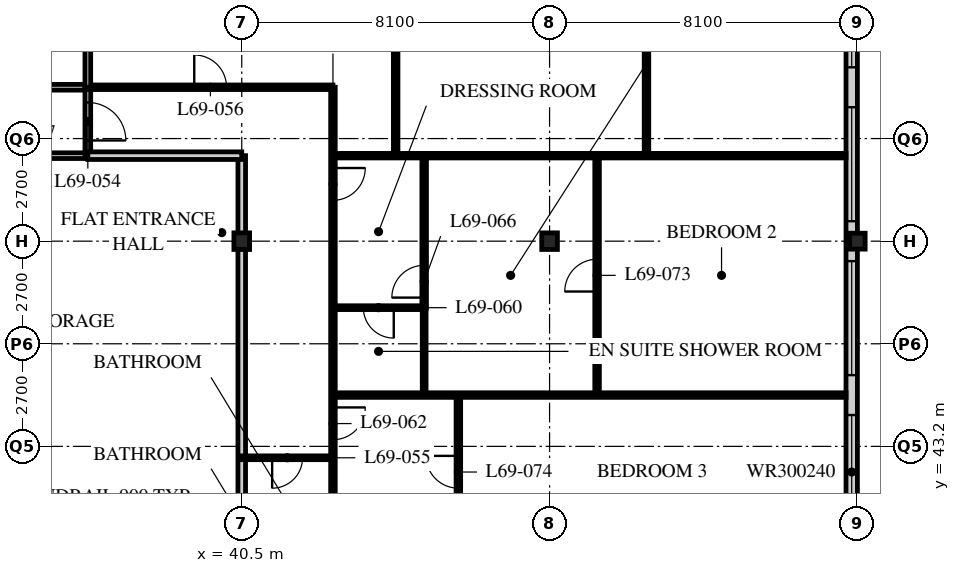
"""IFC4 building model, lengths in metres.
Left out: names, types, materials, properties, quantities, classifications, styles, units other than length and angle.
Written with IfcOpenShell. Run it as: python <this file> out.ifc"""

import sys

from ifc_helpers import new_model, si_unit, direction, frame, frame_2d, origin, origin_2d, place, context, subcontext, project, spatial, rectangle, i_section, extrude, element, fill, save


model = new_model("IFC4")
c1 = context("Model", 3, precision=1e-05, world=origin(), true_north=direction((0.0, 1.0)))
c2 = subcontext(c1, "Body", "Model", "MODEL_VIEW")
j1 = project(units=[si_unit("LENGTHUNIT", "METRE"), si_unit("PLANEANGLEUNIT", "RADIAN")], contexts=[c1])
p1 = place(None, origin())
s1 = spatial("IfcSite", under=j1, at=p1, CompositionType="ELEMENT")
p2 = place(p1, origin())
s2 = spatial("IfcBuilding", under=s1, at=p2, CompositionType="ELEMENT")
p3 = place(p2, frame((0.0, 0.0, 269.7)))
s3 = spatial("IfcBuildingStorey", under=s2, at=p3, CompositionType="ELEMENT", Elevation=269.7)
for number, where, z_axis, x_axis in (
    (1, (40.5, 48.6, 0.0), (0.0, 0.0, 1.0), (1.0, 0.0, 0.0)),
    (2, (48.6, 48.6, 0.0), (0.0, 0.0, 1.0), (1.0, 0.0, 0.0)),
):
    element("IfcColumn", number, at=place(p3, frame(where, z_axis=z_axis, x_axis=x_axis)), inside=s3, PredefinedType="COLUMN", context=c2, shape_type="SweptSolid", body=[
        extrude(i_section(OverallWidth=0.412, OverallDepth=0.437, WebThickness=0.036, FlangeThickness=0.058, FilletRadius=0.015, at=origin_2d()), origin(), (0.0, 0.0, 1.0), 3.9),
    ])
p4 = place(p3, frame((56.7, 48.6, 0.0), z_axis=(0.0, 0.0, 1.0), x_axis=(1.0, 0.0, 0.0)))
e3 = element("IfcColumn", 3, at=p4, inside=s3, PredefinedType="COLUMN", context=c2, shape_type="SweptSolid", body=[
    extrude(i_section(OverallWidth=0.407, OverallDepth=0.419, WebThickness=0.031, FlangeThickness=0.049, FilletRadius=0.015, at=origin_2d()), origin(), (0.0, 0.0, 1.0), 3.9),
])
p5 = place(p3, frame((56.55, 24.6, 0.0), z_axis=(0.0, 0.0, 1.0), x_axis=(0.0, 1.0, 0.0)))
e4 = element("IfcWall", 4, at=p5, inside=s3, PredefinedType="SOLIDWALL", context=c2, shape_type="SweptSolid", body=[
    extrude(rectangle(XDim=32.1, YDim=0.3, at=frame_2d((16.05, 0.0))), origin(), (0.0, 0.0, 1.0), 3.69),
])
p6 = place(p5, frame((0.225, 0.0, 0.6)))
e5 = element("IfcOpeningElement", 5, at=p6, cuts=e4, PredefinedType="OPENING", context=c2, shape_type="SweptSolid", body=[
    extrude(rectangle(XDim=3.0, YDim=2.4, at=frame_2d((1.5, 1.2))), frame((0.0, 0.16, 0.0), z_axis=(0.0, -1.0, 0.0), x_axis=(1.0, 0.0, 0.0)), (0.0, 0.0, 1.0), 0.32),
])
p7 = place(p5, frame((4.275, 0.0, 0.6)))
e6 = element("IfcOpeningElement", 6, at=p7, cuts=e4, PredefinedType="OPENING", context=c2, shape_type="SweptSolid", body=[
    extrude(rectangle(XDim=3.0, YDim=2.4, at=frame_2d((1.5, 1.2))), frame((0.0, 0.16, 0.0), z_axis=(0.0, -1.0, 0.0), x_axis=(1.0, 0.0, 0.0)), (0.0, 0.0, 1.0), 0.32),
])
p8 = place(p5, frame((8.325, 0.0, 0.6)))
e7 = element("IfcOpeningElement", 7, at=p8, cuts=e4, PredefinedType="OPENING", context=c2, shape_type="SweptSolid", body=[
    extrude(rectangle(XDim=3.0, YDim=2.4, at=frame_2d((1.5, 1.2))), frame((0.0, 0.16, 0.0), z_axis=(0.0, -1.0, 0.0), x_axis=(1.0, 0.0, 0.0)), (0.0, 0.0, 1.0), 0.32),
])
p9 = place(p5, frame((12.375, 0.0, 0.6)))
e8 = element("IfcOpeningElement", 8, at=p9, cuts=e4, PredefinedType="OPENING", context=c2, shape_type="SweptSolid", body=[
    extrude(rectangle(XDim=3.0, YDim=2.4, at=frame_2d((1.5, 1.2))), frame((0.0, 0.16, 0.0), z_axis=(0.0, -1.0, 0.0), x_axis=(1.0, 0.0, 0.0)), (0.0, 0.0, 1.0), 0.32),
])
p10 = place(p5, frame((16.425, 0.0, 0.6)))
e9 = element("IfcOpeningElement", 9, at=p10, cuts=e4, PredefinedType="OPENING", context=c2, shape_type="SweptSolid", body=[
    extrude(rectangle(XDim=3.0, YDim=2.4, at=frame_2d((1.5, 1.2))), frame((0.0, 0.16, 0.0), z_axis=(0.0, -1.0, 0.0), x_axis=(1.0, 0.0, 0.0)), (0.0, 0.0, 1.0), 0.32),
])
p11 = place(p5, frame((20.475, 0.0, 0.6)))
e10 = element("IfcOpeningElement", 10, at=p11, cuts=e4, PredefinedType="OPENING", context=c2, shape_type="SweptSolid", body=[
    extrude(rectangle(XDim=3.0, YDim=2.4, at=frame_2d((1.5, 1.2))), frame((0.0, 0.16, 0.0), z_axis=(0.0, -1.0, 0.0), x_axis=(1.0, 0.0, 0.0)), (0.0, 0.0, 1.0), 0.32),
])
p12 = place(p5, frame((24.525, 0.0, 0.6)))
e11 = element("IfcOpeningElement", 11, at=p12, cuts=e4, PredefinedType="OPENING", context=c2, shape_type="SweptSolid", body=[
    extrude(rectangle(XDim=3.0, YDim=2.4, at=frame_2d((1.5, 1.2))), frame((0.0, 0.16, 0.0), z_axis=(0.0, -1.0, 0.0), x_axis=(1.0, 0.0, 0.0)), (0.0, 0.0, 1.0), 0.32),
])
p13 = place(p5, frame((28.575, 0.0, 0.6)))
e12 = element("IfcOpeningElement", 12, at=p13, cuts=e4, PredefinedType="OPENING", context=c2, shape_type="SweptSolid", body=[
    extrude(rectangle(XDim=3.0, YDim=2.4, at=frame_2d((1.5, 1.2))), frame((0.0, 0.16, 0.0), z_axis=(0.0, -1.0, 0.0), x_axis=(1.0, 0.0, 0.0)), (0.0, 0.0, 1.0), 0.32),
])
p14 = place(p3, frame((12.15, 52.65, 0.0), z_axis=(0.0, 0.0, 1.0), x_axis=(1.0, 0.0, 0.0)))
e13 = element("IfcWall", 13, at=p14, inside=s3, PredefinedType="PARTITIONING", context=c2, shape_type="SweptSolid", body=[
    extrude(rectangle(XDim=24.3, YDim=0.15, at=frame_2d((12.15, 0.0))), origin(), (0.0, 0.0, 1.0), 3.69),
])
p15 = place(p14, frame((6.4, 0.0, 0.0)))
e14 = element("IfcOpeningElement", 14, at=p15, cuts=e13, PredefinedType="OPENING", context=c2, shape_type="SweptSolid", body=[
    extrude(rectangle(XDim=1.0, YDim=2.1, at=frame_2d((0.5, 1.05))), frame((0.0, 0.085, 0.0), z_axis=(0.0, -1.0, 0.0), x_axis=(1.0, 0.0, 0.0)), (0.0, 0.0, 1.0), 0.17),
])
p16 = place(p14, frame((8.5, 0.0, 0.0)))
e15 = element("IfcOpeningElement", 15, at=p16, cuts=e13, PredefinedType="OPENING", context=c2, shape_type="SweptSolid", body=[
    extrude(rectangle(XDim=1.0, YDim=2.1, at=frame_2d((0.5, 1.05))), frame((0.0, 0.085, 0.0), z_axis=(0.0, -1.0, 0.0), x_axis=(1.0, 0.0, 0.0)), (0.0, 0.0, 1.0), 0.17),
])
p17 = place(p14, frame((16.6, 0.0, 0.0)))
e16 = element("IfcOpeningElement", 16, at=p17, cuts=e13, PredefinedType="OPENING", context=c2, shape_type="SweptSolid", body=[
    extrude(rectangle(XDim=1.0, YDim=2.1, at=frame_2d((0.5, 1.05))), frame((0.0, 0.085, 0.0), z_axis=(0.0, -1.0, 0.0), x_axis=(1.0, 0.0, 0.0)), (0.0, 0.0, 1.0), 0.17),
])
p18 = place(p14, frame((1.525, 0.0, 0.0)))
e17 = element("IfcOpeningElement", 17, at=p18, cuts=e13, PredefinedType="OPENING", context=c2, shape_type="SweptSolid", body=[
    extrude(rectangle(XDim=1.0, YDim=2.1, at=frame_2d((0.5, 1.05))), frame((0.0, 0.085, 0.0), z_axis=(0.0, -1.0, 0.0), x_axis=(1.0, 0.0, 0.0)), (0.0, 0.0, 1.0), 0.17),
])
p19 = place(p3, frame((29.56, 50.85, 0.0), z_axis=(0.0, 0.0, 1.0), x_axis=(1.0, 0.0, 0.0)))
e18 = element("IfcWall", 18, at=p19, inside=s3, PredefinedType="PARTITIONING", context=c2, shape_type="SweptSolid", body=[
    extrude(rectangle(XDim=6.89, YDim=0.15, at=frame_2d((3.445, 0.0))), origin(), (0.0, 0.0, 1.0), 3.69),
])
p20 = place(p19, frame((1.49, 0.0, 0.0)))
e19 = element("IfcOpeningElement", 19, at=p20, cuts=e18, PredefinedType="OPENING", context=c2, shape_type="SweptSolid", body=[
    extrude(rectangle(XDim=1.0, YDim=2.1, at=frame_2d((0.5, 1.05))), frame((0.0, 0.085, 0.0), z_axis=(0.0, -1.0, 0.0), x_axis=(1.0, 0.0, 0.0)), (0.0, 0.0, 1.0), 0.17),
])
p21 = place(p19, frame((4.69, 0.0, 0.0)))
e20 = element("IfcOpeningElement", 20, at=p21, cuts=e18, PredefinedType="OPENING", context=c2, shape_type="SweptSolid", body=[
    extrude(rectangle(XDim=1.0, YDim=2.1, at=frame_2d((0.5, 1.05))), frame((0.0, 0.085, 0.0), z_axis=(0.0, -1.0, 0.0), x_axis=(1.0, 0.0, 0.0)), (0.0, 0.0, 1.0), 0.17),
])
p22 = place(p3, frame((36.45, 50.85, 0.0), z_axis=(0.0, 0.0, 1.0), x_axis=(0.0, 1.0, 0.0)))
e21 = element("IfcWall", 21, at=p22, inside=s3, PredefinedType="PARTITIONING", context=c2, shape_type="SweptSolid", body=[
    extrude(rectangle(XDim=1.8, YDim=0.15, at=frame_2d((0.9, 0.0))), origin(), (0.0, 0.0, 1.0), 3.69),
])
p23 = place(p22, frame((0.4, 0.0, 0.0)))
e22 = element("IfcOpeningElement", 22, at=p23, cuts=e21, PredefinedType="OPENING", context=c2, shape_type="SweptSolid", body=[
    extrude(rectangle(XDim=1.0, YDim=2.1, at=frame_2d((0.5, 1.05))), frame((0.0, 0.085, 0.0), z_axis=(0.0, -1.0, 0.0), x_axis=(1.0, 0.0, 0.0)), (0.0, 0.0, 1.0), 0.17),
])
p24 = place(p3, frame((40.5, 40.5, 0.0), z_axis=(0.0, 0.0, 1.0), x_axis=(0.0, 1.0, 0.0)))
e23 = element("IfcWall", 23, at=p24, inside=s3, PredefinedType="SOLIDWALL", context=c2, shape_type="SweptSolid", body=[
    extrude(rectangle(XDim=10.35, YDim=0.2, at=frame_2d((5.175, 0.0))), origin(), (0.0, 0.0, 1.0), 3.078),
])
p25 = place(p3, frame((40.5, 42.9, 0.0), z_axis=(0.0, 0.0, 1.0), x_axis=(1.0, 0.0, 0.0)))
e24 = element("IfcWall", 24, at=p25, inside=s3, PredefinedType="PARTITIONING", context=c2, shape_type="SweptSolid", body=[
    extrude(rectangle(XDim=2.4, YDim=0.1, at=frame_2d((1.2, 0.0))), origin(), (0.0, 0.0, 1.0), 3.69),
])
p26 = place(p25, frame((0.8, 0.0, 0.0)))
e25 = element("IfcOpeningElement", 25, at=p26, cuts=e24, PredefinedType="OPENING", context=c2, shape_type="SweptSolid", body=[
    extrude(rectangle(XDim=0.8, YDim=2.1, at=frame_2d((0.4, 1.05))), frame((0.0, 0.06, 0.0), z_axis=(0.0, -1.0, 0.0), x_axis=(1.0, 0.0, 0.0)), (0.0, 0.0, 1.0), 0.12),
])
p27 = place(p3, frame((42.9, 52.65, 0.0), z_axis=(0.0, 0.0, 1.0), x_axis=(0.0, -1.0, 0.0)))
e26 = element("IfcWall", 26, at=p27, inside=s3, PredefinedType="PARTITIONING", context=c2, shape_type="SweptSolid", body=[
    extrude(rectangle(XDim=12.15, YDim=0.12, at=frame_2d((6.075, 0.0))), origin(), (0.0, 0.0, 1.0), 3.69),
])
p28 = place(p27, frame((2.125, 0.0, 0.0)))
e27 = element("IfcOpeningElement", 27, at=p28, cuts=e26, PredefinedType="OPENING", context=c2, shape_type="SweptSolid", body=[
    extrude(rectangle(XDim=0.85, YDim=2.1, at=frame_2d((0.425, 1.05))), frame((0.0, 0.07, 0.0), z_axis=(0.0, -1.0, 0.0), x_axis=(1.0, 0.0, 0.0)), (0.0, 0.0, 1.0), 0.14),
])
p29 = place(p27, frame((8.425, 0.0, 0.0)))
e28 = element("IfcOpeningElement", 28, at=p29, cuts=e26, PredefinedType="OPENING", context=c2, shape_type="SweptSolid", body=[
    extrude(rectangle(XDim=0.85, YDim=2.1, at=frame_2d((0.425, 1.05))), frame((0.0, 0.07, 0.0), z_axis=(0.0, -1.0, 0.0), x_axis=(1.0, 0.0, 0.0)), (0.0, 0.0, 1.0), 0.14),
])
p30 = place(p3, frame((36.45, 52.65, 0.0), z_axis=(0.0, 0.0, 1.0), x_axis=(1.0, 0.0, 0.0)))
e29 = element("IfcWall", 29, at=p30, inside=s3, PredefinedType="PARTITIONING", context=c2, shape_type="SweptSolid", body=[
    extrude(rectangle(XDim=6.45, YDim=0.12, at=frame_2d((3.225, 0.0))), origin(), (0.0, 0.0, 1.0), 3.69),
])
p31 = place(p30, frame((2.8, 0.0, 0.0)))
e30 = element("IfcOpeningElement", 30, at=p31, cuts=e29, PredefinedType="OPENING", context=c2, shape_type="SweptSolid", body=[
    extrude(rectangle(XDim=0.85, YDim=2.1, at=frame_2d((0.425, 1.05))), frame((0.0, 0.07, 0.0), z_axis=(0.0, -1.0, 0.0), x_axis=(1.0, 0.0, 0.0)), (0.0, 0.0, 1.0), 0.14),
])
p32 = place(p3, frame((36.45, 50.85, 0.0), z_axis=(0.0, 0.0, 1.0), x_axis=(1.0, 0.0, 0.0)))
e31 = element("IfcWall", 31, at=p32, inside=s3, PredefinedType="SOLIDWALL", context=c2, shape_type="SweptSolid", body=[
    extrude(rectangle(XDim=4.05, YDim=0.2, at=frame_2d((2.025, 0.0))), origin(), (0.0, 0.0, 1.0), 3.69),
])
p33 = place(p3, frame((42.9, 50.85, 0.0), z_axis=(0.0, 0.0, 1.0), x_axis=(1.0, 0.0, 0.0)))
e32 = element("IfcWall", 32, at=p33, inside=s3, PredefinedType="PARTITIONING", context=c2, shape_type="SweptSolid", body=[
    extrude(rectangle(XDim=13.5, YDim=0.12, at=frame_2d((6.75, 0.0))), origin(), (0.0, 0.0, 1.0), 3.69),
])
p34 = place(p3, frame((36.45, 64.5, 0.0), z_axis=(0.0, 0.0, 1.0), x_axis=(0.0, -1.0, 0.0)))
e33 = element("IfcWall", 33, at=p34, inside=s3, PredefinedType="PARTITIONING", context=c2, shape_type="SweptSolid", body=[
    extrude(rectangle(XDim=11.85, YDim=0.15, at=frame_2d((5.925, 0.0))), origin(), (0.0, 0.0, 1.0), 3.69),
])
p35 = place(p3, frame((44.55, 64.5, 0.0), z_axis=(0.0, 0.0, 1.0), x_axis=(0.0, -1.0, 0.0)))
e34 = element("IfcWall", 34, at=p35, inside=s3, PredefinedType="PARTITIONING", context=c2, shape_type="SweptSolid", body=[
    extrude(rectangle(XDim=13.65, YDim=0.12, at=frame_2d((6.825, 0.0))), origin(), (0.0, 0.0, 1.0), 3.69),
])
p36 = place(p35, frame((8.425, 0.0, 0.0)))
e35 = element("IfcOpeningElement", 35, at=p36, cuts=e34, PredefinedType="OPENING", context=c2, shape_type="SweptSolid", body=[
    extrude(rectangle(XDim=0.85, YDim=2.1, at=frame_2d((0.425, 1.05))), frame((0.0, 0.07, 0.0), z_axis=(0.0, -1.0, 0.0), x_axis=(1.0, 0.0, 0.0)), (0.0, 0.0, 1.0), 0.14),
])
p37 = place(p35, frame((2.5, 0.0, 0.0)))
e36 = element("IfcOpeningElement", 36, at=p37, cuts=e34, PredefinedType="OPENING", context=c2, shape_type="SweptSolid", body=[
    extrude(rectangle(XDim=0.85, YDim=2.1, at=frame_2d((0.425, 1.05))), frame((0.0, 0.07, 0.0), z_axis=(0.0, -1.0, 0.0), x_axis=(1.0, 0.0, 0.0)), (0.0, 0.0, 1.0), 0.14),
])
p38 = place(p3, frame((42.9, 46.85, 0.0), z_axis=(0.0, 0.0, 1.0), x_axis=(1.0, 0.0, 0.0)))
e37 = element("IfcWall", 37, at=p38, inside=s3, PredefinedType="PARTITIONING", context=c2, shape_type="SweptSolid", body=[
    extrude(rectangle(XDim=2.4, YDim=0.1, at=frame_2d((1.2, 0.0))), origin(), (0.0, 0.0, 1.0), 3.69),
])
p39 = place(p38, frame((0.8, 0.0, 0.0)))
e38 = element("IfcOpeningElement", 38, at=p39, cuts=e37, PredefinedType="OPENING", context=c2, shape_type="SweptSolid", body=[
    extrude(rectangle(XDim=0.8, YDim=2.1, at=frame_2d((0.4, 1.05))), frame((0.0, 0.06, 0.0), z_axis=(0.0, -1.0, 0.0), x_axis=(1.0, 0.0, 0.0)), (0.0, 0.0, 1.0), 0.12),
])
p40 = place(p3, frame((45.3, 46.85, 0.0), z_axis=(0.0, 0.0, 1.0), x_axis=(0.0, -1.0, 0.0)))
e39 = element("IfcWall", 39, at=p40, inside=s3, PredefinedType="PARTITIONING", context=c2, shape_type="SweptSolid", body=[
    extrude(rectangle(XDim=2.3, YDim=0.1, at=frame_2d((1.15, 0.0))), origin(), (0.0, 0.0, 1.0), 3.69),
])
p41 = place(p3, frame((42.9, 44.55, 0.0), z_axis=(0.0, 0.0, 1.0), x_axis=(1.0, 0.0, 0.0)))
e40 = element("IfcWall", 40, at=p41, inside=s3, PredefinedType="PARTITIONING", context=c2, shape_type="SweptSolid", body=[
    extrude(rectangle(XDim=13.5, YDim=0.12, at=frame_2d((6.75, 0.0))), origin(), (0.0, 0.0, 1.0), 3.69),
])
p42 = place(p3, frame((45.3, 50.85, 0.0), z_axis=(0.0, 0.0, 1.0), x_axis=(0.0, -1.0, 0.0)))
e41 = element("IfcWall", 41, at=p42, inside=s3, PredefinedType="PARTITIONING", context=c2, shape_type="SweptSolid", body=[
    extrude(rectangle(XDim=4.01, YDim=0.12, at=frame_2d((2.005, 0.0))), origin(), (0.0, 0.0, 1.0), 3.69),
])
p43 = place(p42, frame((2.885, 0.0, 0.0)))
e42 = element("IfcOpeningElement", 42, at=p43, cuts=e41, PredefinedType="OPENING", context=c2, shape_type="SweptSolid", body=[
    extrude(rectangle(XDim=0.85, YDim=2.1, at=frame_2d((0.425, 1.05))), frame((0.0, 0.07, 0.0), z_axis=(0.0, -1.0, 0.0), x_axis=(1.0, 0.0, 0.0)), (0.0, 0.0, 1.0), 0.14),
])
p44 = place(p3, frame((46.2, 28.35, 0.0), z_axis=(0.0, 0.0, 1.0), x_axis=(0.0, 1.0, 0.0)))
e43 = element("IfcWall", 43, at=p44, inside=s3, PredefinedType="PARTITIONING", context=c2, shape_type="SweptSolid", body=[
    extrude(rectangle(XDim=16.2, YDim=0.12, at=frame_2d((8.1, 0.0))), origin(), (0.0, 0.0, 1.0), 3.69),
])
p45 = place(p44, frame((1.6, 0.0, 0.0)))
e44 = element("IfcOpeningElement", 44, at=p45, cuts=e43, PredefinedType="OPENING", context=c2, shape_type="SweptSolid", body=[
    extrude(rectangle(XDim=0.85, YDim=2.1, at=frame_2d((0.425, 1.05))), frame((0.0, 0.07, 0.0), z_axis=(0.0, -1.0, 0.0), x_axis=(1.0, 0.0, 0.0)), (0.0, 0.0, 1.0), 0.14),
])
p46 = place(p44, frame((5.65, 0.0, 0.0)))
e45 = element("IfcOpeningElement", 45, at=p46, cuts=e43, PredefinedType="OPENING", context=c2, shape_type="SweptSolid", body=[
    extrude(rectangle(XDim=0.85, YDim=2.1, at=frame_2d((0.425, 1.05))), frame((0.0, 0.07, 0.0), z_axis=(0.0, -1.0, 0.0), x_axis=(1.0, 0.0, 0.0)), (0.0, 0.0, 1.0), 0.14),
])
p47 = place(p44, frame((9.7, 0.0, 0.0)))
e46 = element("IfcOpeningElement", 46, at=p47, cuts=e43, PredefinedType="OPENING", context=c2, shape_type="SweptSolid", body=[
    extrude(rectangle(XDim=0.85, YDim=2.1, at=frame_2d((0.425, 1.05))), frame((0.0, 0.07, 0.0), z_axis=(0.0, -1.0, 0.0), x_axis=(1.0, 0.0, 0.0)), (0.0, 0.0, 1.0), 0.14),
])
p48 = place(p44, frame((13.75, 0.0, 0.0)))
e47 = element("IfcOpeningElement", 47, at=p48, cuts=e43, PredefinedType="OPENING", context=c2, shape_type="SweptSolid", body=[
    extrude(rectangle(XDim=0.85, YDim=2.1, at=frame_2d((0.425, 1.05))), frame((0.0, 0.07, 0.0), z_axis=(0.0, -1.0, 0.0), x_axis=(1.0, 0.0, 0.0)), (0.0, 0.0, 1.0), 0.14),
])
p49 = place(p3, frame((51.15, 50.85, 0.0), z_axis=(0.0, 0.0, 1.0), x_axis=(0.0, 1.0, 0.0)))
e48 = element("IfcWall", 48, at=p49, inside=s3, PredefinedType="PARTITIONING", context=c2, shape_type="SweptSolid", body=[
    extrude(rectangle(XDim=7.8, YDim=0.12, at=frame_2d((3.9, 0.0))), origin(), (0.0, 0.0, 1.0), 3.69),
])
p50 = place(p49, frame((3.475, 0.0, 0.0)))
e49 = element("IfcOpeningElement", 49, at=p50, cuts=e48, PredefinedType="OPENING", context=c2, shape_type="SweptSolid", body=[
    extrude(rectangle(XDim=0.85, YDim=2.1, at=frame_2d((0.425, 1.05))), frame((0.0, 0.07, 0.0), z_axis=(0.0, -1.0, 0.0), x_axis=(1.0, 0.0, 0.0)), (0.0, 0.0, 1.0), 0.14),
])
p51 = place(p3, frame((49.85, 44.55, 0.0), z_axis=(0.0, 0.0, 1.0), x_axis=(0.0, 1.0, 0.0)))
e50 = element("IfcWall", 50, at=p51, inside=s3, PredefinedType="PARTITIONING", context=c2, shape_type="SweptSolid", body=[
    extrude(rectangle(XDim=6.3, YDim=0.12, at=frame_2d((3.15, 0.0))), origin(), (0.0, 0.0, 1.0), 3.69),
])
p52 = place(p51, frame((2.725, 0.0, 0.0)))
e51 = element("IfcOpeningElement", 51, at=p52, cuts=e50, PredefinedType="OPENING", context=c2, shape_type="SweptSolid", body=[
    extrude(rectangle(XDim=0.85, YDim=2.1, at=frame_2d((0.425, 1.05))), frame((0.0, 0.07, 0.0), z_axis=(0.0, -1.0, 0.0), x_axis=(1.0, 0.0, 0.0)), (0.0, 0.0, 1.0), 0.14),
])
p53 = place(p10, origin())
e52 = element("IfcWindow", 52, at=p53, inside=s3, PartitioningType="SINGLE_PANEL", PredefinedType="WINDOW", context=c2, shape_type="SweptSolid", body=[
    extrude(rectangle(XDim=3.0, YDim=2.4, at=frame_2d((1.5, 1.2))), frame((0.0, 0.03, 0.0), z_axis=(0.0, -1.0, 0.0), x_axis=(1.0, 0.0, 0.0)), (0.0, 0.0, 1.0), 0.06),
])
fill(e9, e52)
p54 = place(p11, origin())
e53 = element("IfcWindow", 53, at=p54, inside=s3, PartitioningType="SINGLE_PANEL", PredefinedType="WINDOW", context=c2, shape_type="SweptSolid", body=[
    extrude(rectangle(XDim=3.0, YDim=2.4, at=frame_2d((1.5, 1.2))), frame((0.0, 0.03, 0.0), z_axis=(0.0, -1.0, 0.0), x_axis=(1.0, 0.0, 0.0)), (0.0, 0.0, 1.0), 0.06),
])
fill(e10, e53)
p55 = place(p12, origin())
e54 = element("IfcWindow", 54, at=p55, inside=s3, PartitioningType="SINGLE_PANEL", PredefinedType="WINDOW", context=c2, shape_type="SweptSolid", body=[
    extrude(rectangle(XDim=3.0, YDim=2.4, at=frame_2d((1.5, 1.2))), frame((0.0, 0.03, 0.0), z_axis=(0.0, -1.0, 0.0), x_axis=(1.0, 0.0, 0.0)), (0.0, 0.0, 1.0), 0.06),
])
fill(e11, e54)
p56 = place(p13, origin())
e55 = element("IfcWindow", 55, at=p56, inside=s3, PartitioningType="SINGLE_PANEL", PredefinedType="WINDOW", context=c2, shape_type="SweptSolid", body=[
    extrude(rectangle(XDim=3.0, YDim=2.4, at=frame_2d((1.5, 1.2))), frame((0.0, 0.03, 0.0), z_axis=(0.0, -1.0, 0.0), x_axis=(1.0, 0.0, 0.0)), (0.0, 0.0, 1.0), 0.06),
])
fill(e12, e55)
p57 = place(p23, origin())
e56 = element("IfcDoor", 56, at=p57, inside=s3, OperationType="SINGLE_SWING_RIGHT", PredefinedType="DOOR", context=c2, shape_type="SweptSolid", body=[
    extrude(rectangle(XDim=1.0, YDim=2.1, at=frame_2d((0.5, 1.05))), frame((0.0, 0.025, 0.0), z_axis=(0.0, -1.0, 0.0), x_axis=(1.0, 0.0, 0.0)), (0.0, 0.0, 1.0), 0.05),
])
fill(e22, e56)
p58 = place(p26, origin())
e57 = element("IfcDoor", 57, at=p58, inside=s3, OperationType="SINGLE_SWING_RIGHT", PredefinedType="DOOR", context=c2, shape_type="SweptSolid", body=[
    extrude(rectangle(XDim=0.8, YDim=2.1, at=frame_2d((0.4, 1.05))), frame((0.0, 0.025, 0.0), z_axis=(0.0, -1.0, 0.0), x_axis=(1.0, 0.0, 0.0)), (0.0, 0.0, 1.0), 0.05),
])
fill(e25, e57)
p59 = place(p31, origin())
e58 = element("IfcDoor", 58, at=p59, inside=s3, OperationType="SINGLE_SWING_LEFT", PredefinedType="DOOR", context=c2, shape_type="SweptSolid", body=[
    extrude(rectangle(XDim=0.85, YDim=2.1, at=frame_2d((0.425, 1.05))), frame((0.0, 0.025, 0.0), z_axis=(0.0, -1.0, 0.0), x_axis=(1.0, 0.0, 0.0)), (0.0, 0.0, 1.0), 0.05),
])
fill(e30, e58)
p60 = place(p39, origin())
e59 = element("IfcDoor", 59, at=p60, inside=s3, OperationType="SINGLE_SWING_LEFT", PredefinedType="DOOR", context=c2, shape_type="SweptSolid", body=[
    extrude(rectangle(XDim=0.8, YDim=2.1, at=frame_2d((0.4, 1.05))), frame((0.0, 0.025, 0.0), z_axis=(0.0, -1.0, 0.0), x_axis=(1.0, 0.0, 0.0)), (0.0, 0.0, 1.0), 0.05),
])
fill(e38, e59)
p61 = place(p28, origin())
e60 = element("IfcDoor", 60, at=p61, inside=s3, OperationType="SINGLE_SWING_LEFT", PredefinedType="DOOR", context=c2, shape_type="SweptSolid", body=[
    extrude(rectangle(XDim=0.85, YDim=2.1, at=frame_2d((0.425, 1.05))), frame((0.0, 0.025, 0.0), z_axis=(0.0, -1.0, 0.0), x_axis=(1.0, 0.0, 0.0)), (0.0, 0.0, 1.0), 0.05),
])
fill(e27, e60)
p62 = place(p29, origin())
e61 = element("IfcDoor", 61, at=p62, inside=s3, OperationType="SINGLE_SWING_LEFT", PredefinedType="DOOR", context=c2, shape_type="SweptSolid", body=[
    extrude(rectangle(XDim=0.85, YDim=2.1, at=frame_2d((0.425, 1.05))), frame((0.0, 0.025, 0.0), z_axis=(0.0, -1.0, 0.0), x_axis=(1.0, 0.0, 0.0)), (0.0, 0.0, 1.0), 0.05),
])
fill(e28, e61)
p63 = place(p43, origin())
e62 = element("IfcDoor", 62, at=p63, inside=s3, OperationType="SINGLE_SWING_LEFT", PredefinedType="DOOR", context=c2, shape_type="SweptSolid", body=[
    extrude(rectangle(XDim=0.85, YDim=2.1, at=frame_2d((0.425, 1.05))), frame((0.0, 0.025, 0.0), z_axis=(0.0, -1.0, 0.0), x_axis=(1.0, 0.0, 0.0)), (0.0, 0.0, 1.0), 0.05),
])
fill(e42, e62)
p64 = place(p52, origin())
e63 = element("IfcDoor", 63, at=p64, inside=s3, OperationType="SINGLE_SWING_LEFT", PredefinedType="DOOR", context=c2, shape_type="SweptSolid", body=[
    extrude(rectangle(XDim=0.85, YDim=2.1, at=frame_2d((0.425, 1.05))), frame((0.0, 0.025, 0.0), z_axis=(0.0, -1.0, 0.0), x_axis=(1.0, 0.0, 0.0)), (0.0, 0.0, 1.0), 0.05),
])
fill(e51, e63)
p65 = place(p48, origin())
e64 = element("IfcDoor", 64, at=p65, inside=s3, OperationType="SINGLE_SWING_RIGHT", PredefinedType="DOOR", context=c2, shape_type="SweptSolid", body=[
    extrude(rectangle(XDim=0.85, YDim=2.1, at=frame_2d((0.425, 1.05))), frame((0.0, 0.025, 0.0), z_axis=(0.0, -1.0, 0.0), x_axis=(1.0, 0.0, 0.0)), (0.0, 0.0, 1.0), 0.05),
])
fill(e47, e64)
save(model, sys.argv[1])
